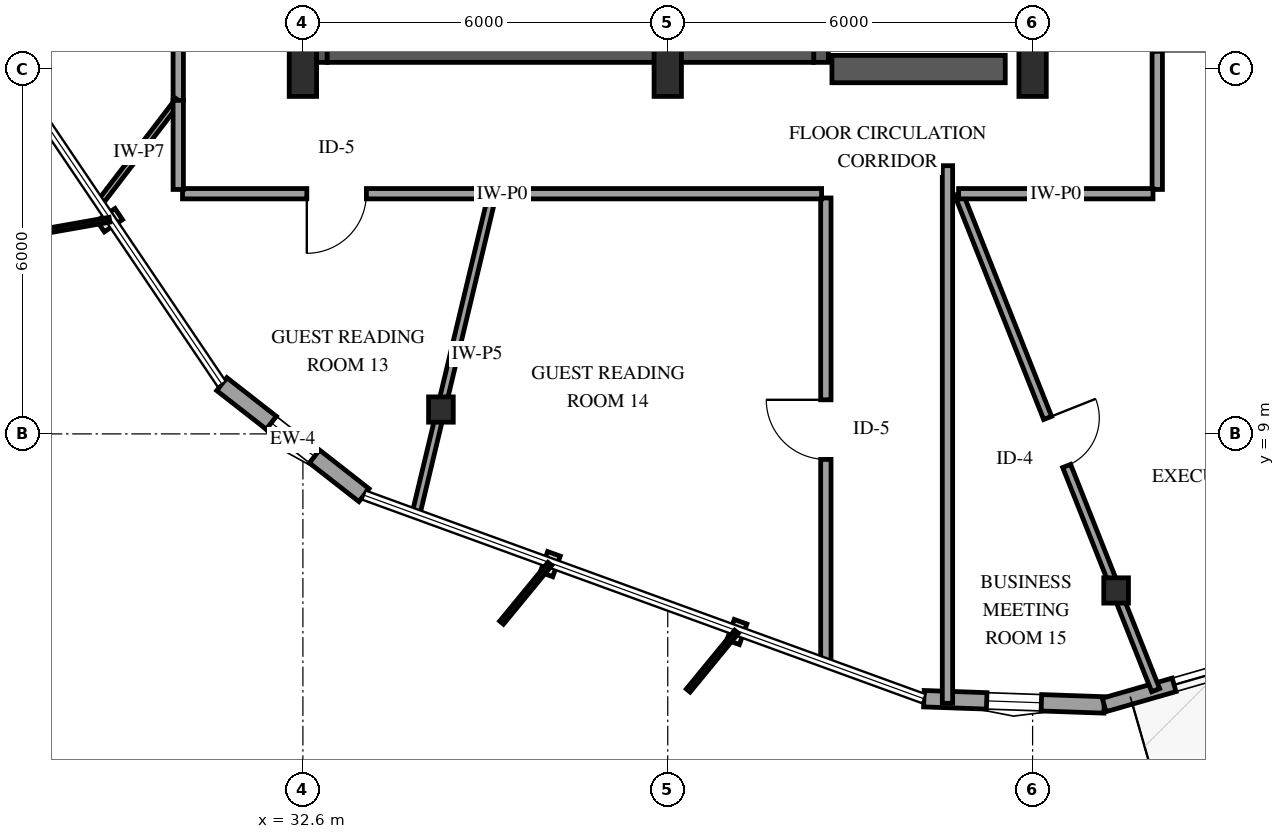
"""IFC4 building model, lengths in metres.
Left out: names, types, materials, properties, quantities, classifications, styles, units other than length and angle.
Written with IfcOpenShell. Run it as: python <this file> out.ifc"""

import sys

from ifc_helpers import new_model, si_unit, direction, frame, frame_2d, origin, origin_2d, place, context, subcontext, project, spatial, rectangle, i_section, extrude, element, fill, save


model = new_model("IFC4")
c1 = context("Model", 3, precision=1e-05, world=origin(), true_north=direction((0.0, 1.0)))
c2 = subcontext(c1, "Body", "Model", "MODEL_VIEW")
j1 = project(units=[si_unit("LENGTHUNIT", "METRE"), si_unit("PLANEANGLEUNIT", "RADIAN")], contexts=[c1])
p1 = place(None, origin())
s1 = spatial("IfcSite", under=j1, at=p1, CompositionType="ELEMENT")
p2 = place(p1, origin())
s2 = spatial("IfcBuilding", under=s1, at=p2, CompositionType="ELEMENT")
p3 = place(p2, frame((0.0, 0.0, 223.0)))
s3 = spatial("IfcBuildingStorey", under=s2, at=p3, CompositionType="ELEMENT", Elevation=223.0)
p4 = place(p3, frame((32.88, 15.11, 0.0), z_axis=(0.0, 0.0, 1.0), x_axis=(0.0, 1.0, 0.0)))
e1 = element("IfcWall", 1, at=p4, inside=s3, PredefinedType="SHEAR", context=c2, shape_type="SweptSolid", body=[
    extrude(rectangle(XDim=3.63, YDim=0.24, at=frame_2d((1.815, 0.0))), origin(), (0.0, 0.0, 1.0), 3.6),
])
p5 = place(p3, frame((41.12, 15.11, 0.0), z_axis=(0.0, 0.0, 1.0), x_axis=(0.0, 1.0, 0.0)))
e2 = element("IfcWall", 2, at=p5, inside=s3, PredefinedType="SHEAR", context=c2, shape_type="SweptSolid", body=[
    extrude(rectangle(XDim=3.63, YDim=0.24, at=frame_2d((1.815, 0.0))), origin(), (0.0, 0.0, 1.0), 3.6),
])
p6 = place(p5, frame((1.255, 0.0, 0.0)))
e3 = element("IfcOpeningElement", 3, at=p6, cuts=e2, PredefinedType="OPENING", context=c2, shape_type="SweptSolid", body=[
    extrude(rectangle(XDim=1.12, YDim=2.15, at=frame_2d((0.56, 1.075))), frame((0.0, 0.13, 0.0), z_axis=(0.0, -1.0, 0.0), x_axis=(1.0, 0.0, 0.0)), (0.0, 0.0, 1.0), 0.26),
])
p7 = place(p3, frame((33.0, 15.23, 0.0), z_axis=(0.0, 0.0, 1.0), x_axis=(1.0, 0.0, 0.0)))
e4 = element("IfcWall", 4, at=p7, inside=s3, PredefinedType="SHEAR", context=c2, shape_type="SweptSolid", body=[
    extrude(rectangle(XDim=8.0, YDim=0.24, at=frame_2d((4.0, 0.0))), origin(), (0.0, 0.0, 1.0), 3.6),
])
p8 = place(p3, frame((41.3, 15.0, 0.0), z_axis=(0.0, 0.0, 1.0), x_axis=(1.0, 0.0, 0.0)))
e5 = element("IfcWall", 5, at=p8, inside=s3, PredefinedType="SHEAR", context=c2, shape_type="SweptSolid", body=[
    extrude(rectangle(XDim=2.85, YDim=0.45, at=frame_2d((1.425, 0.0))), origin(), (0.0, 0.0, 1.0), 3.6),
])
for number, where, z_axis, x_axis in (
    (6, (32.6, 15.0, 0.0), (0.0, 0.0, 1.0), (1.0, 0.0, 0.0)),
    (7, (38.6, 15.0, 0.0), (0.0, 0.0, 1.0), (1.0, 0.0, 0.0)),
    (8, (44.6, 15.0, 0.0), (0.0, 0.0, 1.0), (1.0, 0.0, 0.0)),
):
    element("IfcColumn", number, at=place(p3, frame(where, z_axis=z_axis, x_axis=x_axis)), inside=s3, PredefinedType="PILASTER", context=c2, shape_type="SweptSolid", body=[
        extrude(rectangle(XDim=0.45, YDim=0.9, at=origin_2d()), origin(), (0.0, 0.0, 1.0), 3.6),
    ])
for number, where, z_axis, x_axis in (
    (9, (34.87, 9.401, 0.0), (0.0, 0.0, 1.0), (1.0, 0.0, 0.0)),
    (10, (45.973, 6.426, 0.0), (0.0, 0.0, 1.0), (1.0, 0.0, 0.0)),
):
    element("IfcColumn", number, at=place(p3, frame(where, z_axis=z_axis, x_axis=x_axis)), inside=s3, PredefinedType="COLUMN", context=c2, shape_type="SweptSolid", body=[
        extrude(i_section(OverallWidth=0.406, OverallDepth=0.416, WebThickness=0.03, FlangeThickness=0.048, FilletRadius=0.038, at=origin_2d()), origin(), (0.0, 0.0, 1.0), 3.6),
    ])
p9 = place(p3, frame((31.266, 9.819, 0.0), z_axis=(0.0, 0.0, 1.0), x_axis=(0.788216472233, -0.615398076776, 0.0)))
e11 = element("IfcWall", 11, at=p9, inside=s3, PredefinedType="SOLIDWALL", context=c2, shape_type="SweptSolid", body=[
    extrude(rectangle(XDim=2.967, YDim=0.27, at=frame_2d((1.483, 0.0))), origin(), (0.0, 0.0, 1.0), 2.679),
])
p10 = place(p9, frame((1.033, 0.0, 0.75)))
e12 = element("IfcOpeningElement", 12, at=p10, cuts=e11, PredefinedType="OPENING", context=c2, shape_type="SweptSolid", body=[
    extrude(rectangle(XDim=0.9, YDim=1.5, at=frame_2d((0.45, 0.75))), frame((0.0, 0.145, 0.0), z_axis=(0.0, -1.0, 0.0), x_axis=(1.0, 0.0, 0.0)), (0.0, 0.0, 1.0), 0.29),
])
p11 = place(p3, frame((42.812, 4.646, 0.0), z_axis=(0.0, 0.0, 1.0), x_axis=(0.999402475551, -0.034564314866, 0.0)))
e13 = element("IfcWall", 13, at=p11, inside=s3, PredefinedType="SOLIDWALL", context=c2, shape_type="SweptSolid", body=[
    extrude(rectangle(XDim=2.967, YDim=0.27, at=frame_2d((1.483, 0.0))), origin(), (0.0, 0.0, 1.0), 2.679),
])
p12 = place(p11, frame((1.033, 0.0, 0.75)))
e14 = element("IfcOpeningElement", 14, at=p12, cuts=e13, PredefinedType="OPENING", context=c2, shape_type="SweptSolid", body=[
    extrude(rectangle(XDim=0.9, YDim=1.5, at=frame_2d((0.45, 0.75))), frame((0.0, 0.145, 0.0), z_axis=(0.0, -1.0, 0.0), x_axis=(1.0, 0.0, 0.0)), (0.0, 0.0, 1.0), 0.29),
])
p13 = place(p3, frame((45.777, 4.543, 0.0), z_axis=(0.0, 0.0, 1.0), x_axis=(0.961166762437, 0.275968213361, 0.0)))
e15 = element("IfcWall", 15, at=p13, inside=s3, PredefinedType="SOLIDWALL", context=c2, shape_type="SweptSolid", body=[
    extrude(rectangle(XDim=9.798, YDim=0.23, at=frame_2d((4.899, 0.0))), origin(), (0.0, 0.0, 1.0), 2.679),
])
p14 = place(p13, frame((4.399, 0.0, 0.0)))
e16 = element("IfcOpeningElement", 16, at=p14, cuts=e15, PredefinedType="OPENING", context=c2, shape_type="SweptSolid", body=[
    extrude(rectangle(XDim=1.0, YDim=2.15, at=frame_2d((0.5, 1.075))), frame((0.0, 0.125, 0.0), z_axis=(0.0, -1.0, 0.0), x_axis=(1.0, 0.0, 0.0)), (0.0, 0.0, 1.0), 0.25),
])
p15 = place(p13, frame((1.196, 0.0, 0.72)))
e17 = element("IfcOpeningElement", 17, at=p15, cuts=e15, PredefinedType="OPENING", context=c2, shape_type="SweptSolid", body=[
    extrude(rectangle(XDim=1.05, YDim=1.55, at=frame_2d((0.525, 0.775))), frame((0.0, 0.125, 0.0), z_axis=(0.0, -1.0, 0.0), x_axis=(1.0, 0.0, 0.0)), (0.0, 0.0, 1.0), 0.25),
])
p16 = place(p13, frame((6.039, 0.0, 0.72)))
e18 = element("IfcOpeningElement", 18, at=p16, cuts=e15, PredefinedType="OPENING", context=c2, shape_type="SweptSolid", body=[
    extrude(rectangle(XDim=1.05, YDim=1.55, at=frame_2d((0.525, 0.775))), frame((0.0, 0.125, 0.0), z_axis=(0.0, -1.0, 0.0), x_axis=(1.0, 0.0, 0.0)), (0.0, 0.0, 1.0), 0.25),
])
p17 = place(p3, frame((46.65, 21.265, 0.0), z_axis=(0.0, 0.0, 1.0), x_axis=(0.907138854203, -0.420831437984, 0.0)))
e19 = element("IfcWall", 19, at=p17, inside=s3, PredefinedType="PARTITIONING", context=c2, shape_type="SweptSolid", body=[
    extrude(rectangle(XDim=16.712, YDim=0.13, at=frame_2d((8.356, 0.0))), origin(), (0.0, 0.0, 1.0), 3.3),
])
p18 = place(p3, frame((46.65, 18.573, 0.0), z_axis=(0.0, 0.0, 1.0), x_axis=(0.781487424424, -0.623920992968, 0.0)))
e20 = element("IfcWall", 20, at=p18, inside=s3, PredefinedType="PARTITIONING", context=c2, shape_type="SweptSolid", body=[
    extrude(rectangle(XDim=14.622, YDim=0.11, at=frame_2d((7.311, 0.0))), origin(), (0.0, 0.0, 1.0), 3.3),
])
p19 = place(p3, frame((43.383, 12.95, 0.0), z_axis=(0.0, 0.0, 1.0), x_axis=(0.368969393474, -0.929441545596, 0.0)))
e21 = element("IfcWall", 21, at=p19, inside=s3, PredefinedType="PARTITIONING", context=c2, shape_type="SweptSolid", body=[
    extrude(rectangle(XDim=8.784, YDim=0.14, at=frame_2d((4.392, 0.0))), origin(), (0.0, 0.0, 1.0), 2.595),
])
p20 = place(p19, frame((3.967, 0.0, 0.0)))
e22 = element("IfcOpeningElement", 22, at=p20, cuts=e21, PredefinedType="OPENING", context=c2, shape_type="SweptSolid", body=[
    extrude(rectangle(XDim=0.85, YDim=2.1, at=frame_2d((0.425, 1.05))), frame((0.0, 0.08, 0.0), z_axis=(0.0, -1.0, 0.0), x_axis=(1.0, 0.0, 0.0)), (0.0, 0.0, 1.0), 0.16),
])
p21 = place(p3, frame((41.2, 5.232, 0.0), z_axis=(0.0, 0.0, 1.0), x_axis=(0.0, 1.0, 0.0)))
e23 = element("IfcWall", 23, at=p21, inside=s3, PredefinedType="PARTITIONING", context=c2, shape_type="SweptSolid", body=[
    extrude(rectangle(XDim=7.648, YDim=0.17, at=frame_2d((3.824, 0.0))), origin(), (0.0, 0.0, 1.0), 3.3),
])
p22 = place(p21, frame((3.349, 0.0, 0.0)))
e24 = element("IfcOpeningElement", 24, at=p22, cuts=e23, PredefinedType="OPENING", context=c2, shape_type="SweptSolid", body=[
    extrude(rectangle(XDim=0.98, YDim=2.15, at=frame_2d((0.49, 1.075))), frame((0.0, 0.095, 0.0), z_axis=(0.0, -1.0, 0.0), x_axis=(1.0, 0.0, 0.0)), (0.0, 0.0, 1.0), 0.19),
])
p23 = place(p3, frame((30.55, 14.485, 0.0), z_axis=(0.0, 0.0, 1.0), x_axis=(0.0, 1.0, 0.0)))
e25 = element("IfcWall", 25, at=p23, inside=s3, PredefinedType="PARTITIONING", context=c2, shape_type="SweptSolid", body=[
    extrude(rectangle(XDim=5.621, YDim=0.17, at=frame_2d((2.811, 0.0))), origin(), (0.0, 0.0, 1.0), 3.3),
])
p24 = place(p23, frame((2.336, 0.0, 0.0)))
e26 = element("IfcOpeningElement", 26, at=p24, cuts=e25, PredefinedType="OPENING", context=c2, shape_type="SweptSolid", body=[
    extrude(rectangle(XDim=0.98, YDim=2.15, at=frame_2d((0.49, 1.075))), frame((0.0, 0.095, 0.0), z_axis=(0.0, -1.0, 0.0), x_axis=(1.0, 0.0, 0.0)), (0.0, 0.0, 1.0), 0.19),
])
p25 = place(p3, frame((46.65, 18.573, 0.0), z_axis=(0.0, 0.0, 1.0), x_axis=(0.0, -1.0, 0.0)))
e27 = element("IfcWall", 27, at=p25, inside=s3, PredefinedType="PARTITIONING", context=c2, shape_type="SweptSolid", body=[
    extrude(rectangle(XDim=5.553, YDim=0.17, at=frame_2d((2.776, 0.0))), origin(), (0.0, 0.0, 1.0), 3.3),
])
p26 = place(p25, frame((2.302, 0.0, 0.0)))
e28 = element("IfcOpeningElement", 28, at=p26, cuts=e27, PredefinedType="OPENING", context=c2, shape_type="SweptSolid", body=[
    extrude(rectangle(XDim=0.98, YDim=2.15, at=frame_2d((0.49, 1.075))), frame((0.0, 0.095, 0.0), z_axis=(0.0, -1.0, 0.0), x_axis=(1.0, 0.0, 0.0)), (0.0, 0.0, 1.0), 0.19),
])
p27 = place(p3, frame((35.719, 12.95, 0.0), z_axis=(0.0, 0.0, 1.0), x_axis=(-0.232617700886, -0.972568252224, 0.0)))
e29 = element("IfcWall", 29, at=p27, inside=s3, PredefinedType="PARTITIONING", context=c2, shape_type="SweptSolid", body=[
    extrude(rectangle(XDim=5.417, YDim=0.13, at=frame_2d((2.708, 0.0))), origin(), (0.0, 0.0, 1.0), 2.595),
])
p28 = place(p3, frame((41.13, 12.95, 0.0), z_axis=(0.0, 0.0, 1.0), x_axis=(-1.0, 0.0, 0.0)))
e30 = element("IfcWall", 30, at=p28, inside=s3, PredefinedType="PARTITIONING", context=c2, shape_type="SweptSolid", body=[
    extrude(rectangle(XDim=5.411, YDim=0.17, at=frame_2d((2.706, 0.0))), origin(), (0.0, 0.0, 1.0), 3.3),
])
p29 = place(p3, frame((35.719, 12.95, 0.0), z_axis=(0.0, 0.0, 1.0), x_axis=(-1.0, 0.0, 0.0)))
e31 = element("IfcWall", 31, at=p29, inside=s3, PredefinedType="PARTITIONING", context=c2, shape_type="SweptSolid", body=[
    extrude(rectangle(XDim=5.099, YDim=0.17, at=frame_2d((2.549, 0.0))), origin(), (0.0, 0.0, 1.0), 3.3),
])
p30 = place(p29, frame((2.075, 0.0, 0.0)))
e32 = element("IfcOpeningElement", 32, at=p30, cuts=e31, PredefinedType="OPENING", context=c2, shape_type="SweptSolid", body=[
    extrude(rectangle(XDim=0.98, YDim=2.15, at=frame_2d((0.49, 1.075))), frame((0.0, 0.095, 0.0), z_axis=(0.0, -1.0, 0.0), x_axis=(1.0, 0.0, 0.0)), (0.0, 0.0, 1.0), 0.19),
])
p31 = place(p3, frame((46.58, 12.95, 0.0), z_axis=(0.0, 0.0, 1.0), x_axis=(-1.0, 0.0, 0.0)))
e33 = element("IfcWall", 33, at=p31, inside=s3, PredefinedType="PARTITIONING", context=c2, shape_type="SweptSolid", body=[
    extrude(rectangle(XDim=3.197, YDim=0.17, at=frame_2d((1.599, 0.0))), origin(), (0.0, 0.0, 1.0), 3.3),
])
p32 = place(p3, frame((30.55, 14.485, 0.0), z_axis=(0.0, 0.0, 1.0), x_axis=(-0.607590625291, -0.794250358551, 0.0)))
e34 = element("IfcWall", 34, at=p32, inside=s3, PredefinedType="PARTITIONING", context=c2, shape_type="SweptSolid", body=[
    extrude(rectangle(XDim=2.128, YDim=0.1, at=frame_2d((1.064, 0.0))), origin(), (0.0, 0.0, 1.0), 3.3),
])
p33 = place(p3, frame((30.55, 13.02, 0.0), z_axis=(0.0, 0.0, 1.0), x_axis=(0.0, 1.0, 0.0)))
e35 = element("IfcWall", 35, at=p33, inside=s3, PredefinedType="PARTITIONING", context=c2, shape_type="SweptSolid", body=[
    extrude(rectangle(XDim=1.465, YDim=0.17, at=frame_2d((0.732, 0.0))), origin(), (0.0, 0.0, 1.0), 3.3),
])
p34 = place(p3, frame((43.2, 13.411, 0.0), z_axis=(0.0, 0.0, 1.0), x_axis=(0.0, -1.0, 0.0)))
e36 = element("IfcWall", 36, at=p34, inside=s3, PredefinedType="PARTITIONING", context=c2, shape_type="SweptSolid", body=[
    extrude(rectangle(XDim=8.841, YDim=0.17, at=frame_2d((4.42, 0.0))), origin(), (0.0, 0.0, 1.0), 3.3),
])
p35 = place(p10, origin())
e37 = element("IfcWindow", 37, at=p35, inside=s3, PartitioningType="SINGLE_PANEL", PredefinedType="WINDOW", context=c2, shape_type="SweptSolid", body=[
    extrude(rectangle(XDim=0.9, YDim=1.5, at=frame_2d((0.45, 0.75))), frame((0.0, 0.03, 0.0), z_axis=(0.0, -1.0, 0.0), x_axis=(1.0, 0.0, 0.0)), (0.0, 0.0, 1.0), 0.06),
])
fill(e12, e37)
p36 = place(p12, origin())
e38 = element("IfcWindow", 38, at=p36, inside=s3, PartitioningType="SINGLE_PANEL", PredefinedType="WINDOW", context=c2, shape_type="SweptSolid", body=[
    extrude(rectangle(XDim=0.9, YDim=1.5, at=frame_2d((0.45, 0.75))), frame((0.0, 0.03, 0.0), z_axis=(0.0, -1.0, 0.0), x_axis=(1.0, 0.0, 0.0)), (0.0, 0.0, 1.0), 0.06),
])
fill(e14, e38)
p37 = place(p15, origin())
e39 = element("IfcWindow", 39, at=p37, inside=s3, PartitioningType="SINGLE_PANEL", PredefinedType="WINDOW", context=c2, shape_type="SweptSolid", body=[
    extrude(rectangle(XDim=1.05, YDim=1.55, at=frame_2d((0.525, 0.775))), frame((0.0, 0.03, 0.0), z_axis=(0.0, -1.0, 0.0), x_axis=(1.0, 0.0, 0.0)), (0.0, 0.0, 1.0), 0.06),
])
fill(e17, e39)
p38 = place(p20, origin())
e40 = element("IfcDoor", 40, at=p38, inside=s3, OperationType="SINGLE_SWING_LEFT", PredefinedType="DOOR", context=c2, shape_type="SweptSolid", body=[
    extrude(rectangle(XDim=0.85, YDim=2.1, at=frame_2d((0.425, 1.05))), frame((0.0, 0.025, 0.0), z_axis=(0.0, -1.0, 0.0), x_axis=(1.0, 0.0, 0.0)), (0.0, 0.0, 1.0), 0.05),
])
fill(e22, e40)
p39 = place(p22, origin())
e41 = element("IfcDoor", 41, at=p39, inside=s3, OperationType="SINGLE_SWING_RIGHT", PredefinedType="DOOR", context=c2, shape_type="SweptSolid", body=[
    extrude(rectangle(XDim=0.98, YDim=2.15, at=frame_2d((0.49, 1.075))), frame((0.0, 0.025, 0.0), z_axis=(0.0, -1.0, 0.0), x_axis=(1.0, 0.0, 0.0)), (0.0, 0.0, 1.0), 0.05),
])
fill(e24, e41)
p40 = place(p30, origin())
e42 = element("IfcDoor", 42, at=p40, inside=s3, OperationType="SINGLE_SWING_RIGHT", PredefinedType="DOOR", context=c2, shape_type="SweptSolid", body=[
    extrude(rectangle(XDim=0.98, YDim=2.15, at=frame_2d((0.49, 1.075))), frame((0.0, 0.025, 0.0), z_axis=(0.0, -1.0, 0.0), x_axis=(1.0, 0.0, 0.0)), (0.0, 0.0, 1.0), 0.05),
])
fill(e32, e42)
save(model, sys.argv[1])
